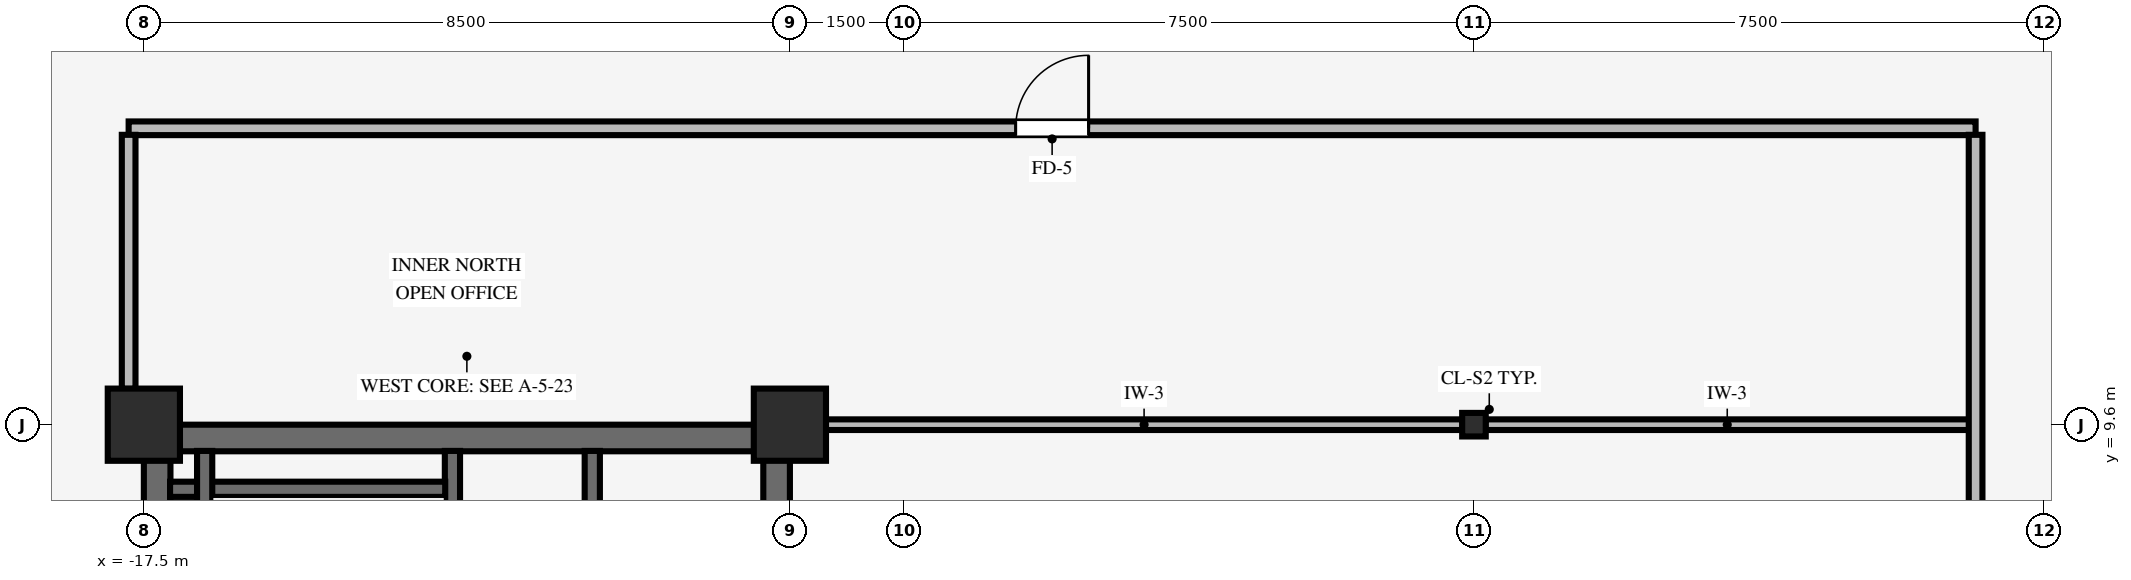
"""IFC4 building model, lengths in metres.
Left out: names, types, materials, properties, quantities, classifications, styles, units other than length and angle.
Written with IfcOpenShell. Run it as: python <this file> out.ifc"""

import sys

from ifc_helpers import new_model, si_unit, direction, frame, frame_2d, origin, origin_2d, place, context, subcontext, project, spatial, rectangle, i_section, extrude, source, transform, mapped, element, fill, save


model = new_model("IFC4")
c1 = context("Model", 3, precision=1e-05, world=origin(), true_north=direction((0.0, 1.0)))
c2 = subcontext(c1, "Body", "Model", "MODEL_VIEW")
j1 = project(units=[si_unit("LENGTHUNIT", "METRE"), si_unit("PLANEANGLEUNIT", "RADIAN")], contexts=[c1])
p1 = place(None, origin())
s1 = spatial("IfcSite", under=j1, at=p1, CompositionType="ELEMENT")
p2 = place(p1, origin())
s2 = spatial("IfcBuilding", under=s1, at=p2, CompositionType="ELEMENT")
p3 = place(p2, frame((0.0, 0.0, 201.85)))
s3 = spatial("IfcBuildingStorey", under=s2, at=p3, CompositionType="ELEMENT", Elevation=201.85)
p4 = place(p3, frame((-17.5, 9.425, 0.0), z_axis=(0.0, 0.0, 1.0), x_axis=(1.0, 0.0, 0.0)))
e1 = element("IfcWall", 1, at=p4, inside=s3, PredefinedType="SHEAR", context=c2, shape_type="SweptSolid", body=[
    extrude(rectangle(XDim=8.5, YDim=0.35, at=frame_2d((4.25, 0.0))), origin(), (0.0, 0.0, 1.0), 3.37),
])
p5 = place(p3, frame((-17.325, -9.255, 0.0), z_axis=(0.0, 0.0, 1.0), x_axis=(0.0, 1.0, 0.0)))
e2 = element("IfcWall", 2, at=p5, inside=s3, PredefinedType="SHEAR", context=c2, shape_type="SweptSolid", body=[
    extrude(rectangle(XDim=18.51, YDim=0.35, at=frame_2d((9.255, 0.0))), origin(), (0.0, 0.0, 1.0), 3.37),
])
p6 = place(p3, frame((-9.175, -9.255, 0.0), z_axis=(0.0, 0.0, 1.0), x_axis=(0.0, 1.0, 0.0)))
e3 = element("IfcWall", 3, at=p6, inside=s3, PredefinedType="SHEAR", context=c2, shape_type="SweptSolid", body=[
    extrude(rectangle(XDim=18.51, YDim=0.35, at=frame_2d((9.255, 0.0))), origin(), (0.0, 0.0, 1.0), 3.37),
])
p7 = place(p6, frame((8.655, 0.0, 0.0)))
e4 = element("IfcOpeningElement", 4, at=p7, cuts=e3, PredefinedType="OPENING", context=c2, shape_type="SweptSolid", body=[
    extrude(rectangle(XDim=1.2, YDim=2.15, at=frame_2d((0.6, 1.075))), frame((0.0, 0.185, 0.0), z_axis=(0.0, -1.0, 0.0), x_axis=(1.0, 0.0, 0.0)), (0.0, 0.0, 1.0), 0.37),
])
for number, where, z_axis, x_axis in (
    (5, (-17.5, 9.6, 0.0), (0.0, 0.0, 1.0), (1.0, 0.0, 0.0)),
    (6, (-9.0, 9.6, 0.0), (0.0, 0.0, 1.0), (1.0, 0.0, 0.0)),
):
    element("IfcColumn", number, at=place(p3, frame(where, z_axis=z_axis, x_axis=x_axis)), inside=s3, PredefinedType="COLUMN", context=c2, shape_type="SweptSolid", body=[
        extrude(rectangle(XDim=0.95, YDim=0.95, at=origin_2d()), origin(), (0.0, 0.0, 1.0), 3.37),
    ])
p8 = place(p3, frame((0.0, 9.6, 0.0), z_axis=(0.0, 0.0, 1.0), x_axis=(1.0, 0.0, 0.0)))
e7 = element("IfcColumn", 7, at=p8, inside=s3, PredefinedType="COLUMN", context=c2, shape_type="SweptSolid", body=[
    extrude(i_section(OverallWidth=0.31, OverallDepth=0.31, WebThickness=0.015, FlangeThickness=0.015, FilletRadius=0.015, at=origin_2d()), origin(), (0.0, 0.0, 1.0), 3.37),
])
p9 = place(p3, frame((-13.44, 0.9, 0.0), z_axis=(0.0, 0.0, 1.0), x_axis=(0.0, 1.0, 0.0)))
e8 = element("IfcWall", 8, at=p9, inside=s3, PredefinedType="SHEAR", context=c2, shape_type="SweptSolid", body=[
    extrude(rectangle(XDim=8.355, YDim=0.2, at=frame_2d((4.177, 0.0))), origin(), (0.0, 0.0, 1.0), 3.37),
])
p10 = place(p9, frame((1.53, 0.0, 0.0), z_axis=(0.0, 0.0, 1.0), x_axis=(-1.0, 0.0, 0.0)))
e9 = element("IfcOpeningElement", 9, at=p10, cuts=e8, PredefinedType="OPENING", context=c2, shape_type="SweptSolid", body=[
    extrude(rectangle(XDim=1.1, YDim=2.15, at=frame_2d((0.55, 1.075))), frame((0.0, 0.11, 0.0), z_axis=(0.0, -1.0, 0.0), x_axis=(1.0, 0.0, 0.0)), (0.0, 0.0, 1.0), 0.22),
])
p11 = place(p3, frame((-17.155, 8.75, 0.0), z_axis=(0.0, 0.0, 1.0), x_axis=(1.0, 0.0, 0.0)))
e10 = element("IfcWall", 10, at=p11, inside=s3, PredefinedType="SHEAR", context=c2, shape_type="SweptSolid", body=[
    extrude(rectangle(XDim=3.62, YDim=0.2, at=frame_2d((1.81, 0.0))), origin(), (0.0, 0.0, 1.0), 3.37),
])
p12 = place(p3, frame((-16.7, 1.095, 0.0), z_axis=(0.0, 0.0, 1.0), x_axis=(0.0, 1.0, 0.0)))
e11 = element("IfcWall", 11, at=p12, inside=s3, PredefinedType="SHEAR", context=c2, shape_type="SweptSolid", body=[
    extrude(rectangle(XDim=8.16, YDim=0.2, at=frame_2d((4.08, 0.0))), origin(), (0.0, 0.0, 1.0), 3.37),
])
p13 = place(p3, frame((-11.6, 1.3, 0.0), z_axis=(0.0, 0.0, 1.0), x_axis=(0.0, 1.0, 0.0)))
e12 = element("IfcWall", 12, at=p13, inside=s3, PredefinedType="SHEAR", context=c2, shape_type="SweptSolid", body=[
    extrude(rectangle(XDim=7.955, YDim=0.2, at=frame_2d((3.978, 0.0))), origin(), (0.0, 0.0, 1.0), 3.37),
])
p14 = place(p3, frame((-8.529, 9.6, 0.0), z_axis=(0.0, 0.0, 1.0), x_axis=(1.0, 0.0, 0.0)))
e13 = element("IfcWall", 13, at=p14, inside=s3, PredefinedType="PARTITIONING", context=c2, shape_type="SweptSolid", body=[
    extrude(rectangle(XDim=8.378, YDim=0.14, at=frame_2d((4.189, 0.0))), origin(), (0.0, 0.0, 1.0), 2.405),
])
p15 = place(p3, frame((0.151, 9.6, 0.0), z_axis=(0.0, 0.0, 1.0), x_axis=(1.0, 0.0, 0.0)))
e14 = element("IfcWall", 14, at=p15, inside=s3, PredefinedType="PARTITIONING", context=c2, shape_type="SweptSolid", body=[
    extrude(rectangle(XDim=6.363, YDim=0.14, at=frame_2d((3.182, 0.0))), origin(), (0.0, 0.0, 1.0), 2.405),
])
p16 = place(p3, frame((-17.7, 13.5, 0.0), z_axis=(0.0, 0.0, 1.0), x_axis=(1.0, 0.0, 0.0)))
e15 = element("IfcWall", 15, at=p16, inside=s3, PredefinedType="PARTITIONING", context=c2, shape_type="SweptSolid", body=[
    extrude(rectangle(XDim=24.3, YDim=0.18, at=frame_2d((12.15, 0.0))), origin(), (0.0, 0.0, 1.0), 3.008),
])
p17 = place(p16, frame((11.67, 0.0, 0.0)))
e16 = element("IfcOpeningElement", 16, at=p17, cuts=e15, PredefinedType="OPENING", context=c2, shape_type="SweptSolid", body=[
    extrude(rectangle(XDim=0.96, YDim=2.1, at=frame_2d((0.48, 1.05))), frame((0.0, 0.1, 0.0), z_axis=(0.0, -1.0, 0.0), x_axis=(1.0, 0.0, 0.0)), (0.0, 0.0, 1.0), 0.2),
])
p18 = place(p3, frame((-17.7, 10.071, 0.0), z_axis=(0.0, 0.0, 1.0), x_axis=(0.0, 1.0, 0.0)))
e17 = element("IfcWall", 17, at=p18, inside=s3, PredefinedType="PARTITIONING", context=c2, shape_type="SweptSolid", body=[
    extrude(rectangle(XDim=3.343, YDim=0.18, at=frame_2d((1.671, 0.0))), origin(), (0.0, 0.0, 1.0), 2.816),
])
p19 = place(p3, frame((6.6, 1.336, 0.0), z_axis=(0.0, 0.0, 1.0), x_axis=(0.0, 1.0, 0.0)))
e18 = element("IfcWall", 18, at=p19, inside=s3, PredefinedType="PARTITIONING", context=c2, shape_type="SweptSolid", body=[
    extrude(rectangle(XDim=12.078, YDim=0.18, at=frame_2d((6.039, 0.0))), origin(), (0.0, 0.0, 1.0), 3.36),
])
m1 = source(origin(), c2, "Body", "SweptSolid", [
    extrude(rectangle(XDim=0.96, YDim=2.1, at=frame_2d((0.48, 1.05))), frame((0.0, 0.025, 0.0), z_axis=(0.0, -1.0, 0.0), x_axis=(1.0, 0.0, 0.0)), (0.0, 0.0, 1.0), 0.05),
])
p20 = place(p17, origin())
e19 = element("IfcDoor", 19, at=p20, inside=s3, OperationType="SINGLE_SWING_RIGHT", PredefinedType="DOOR", context=c2, shape_type="MappedRepresentation", body=[
    mapped(m1, transform((0.0, 0.0, 0.0), scale=1.0)),
])
fill(e16, e19)
save(model, sys.argv[1])
